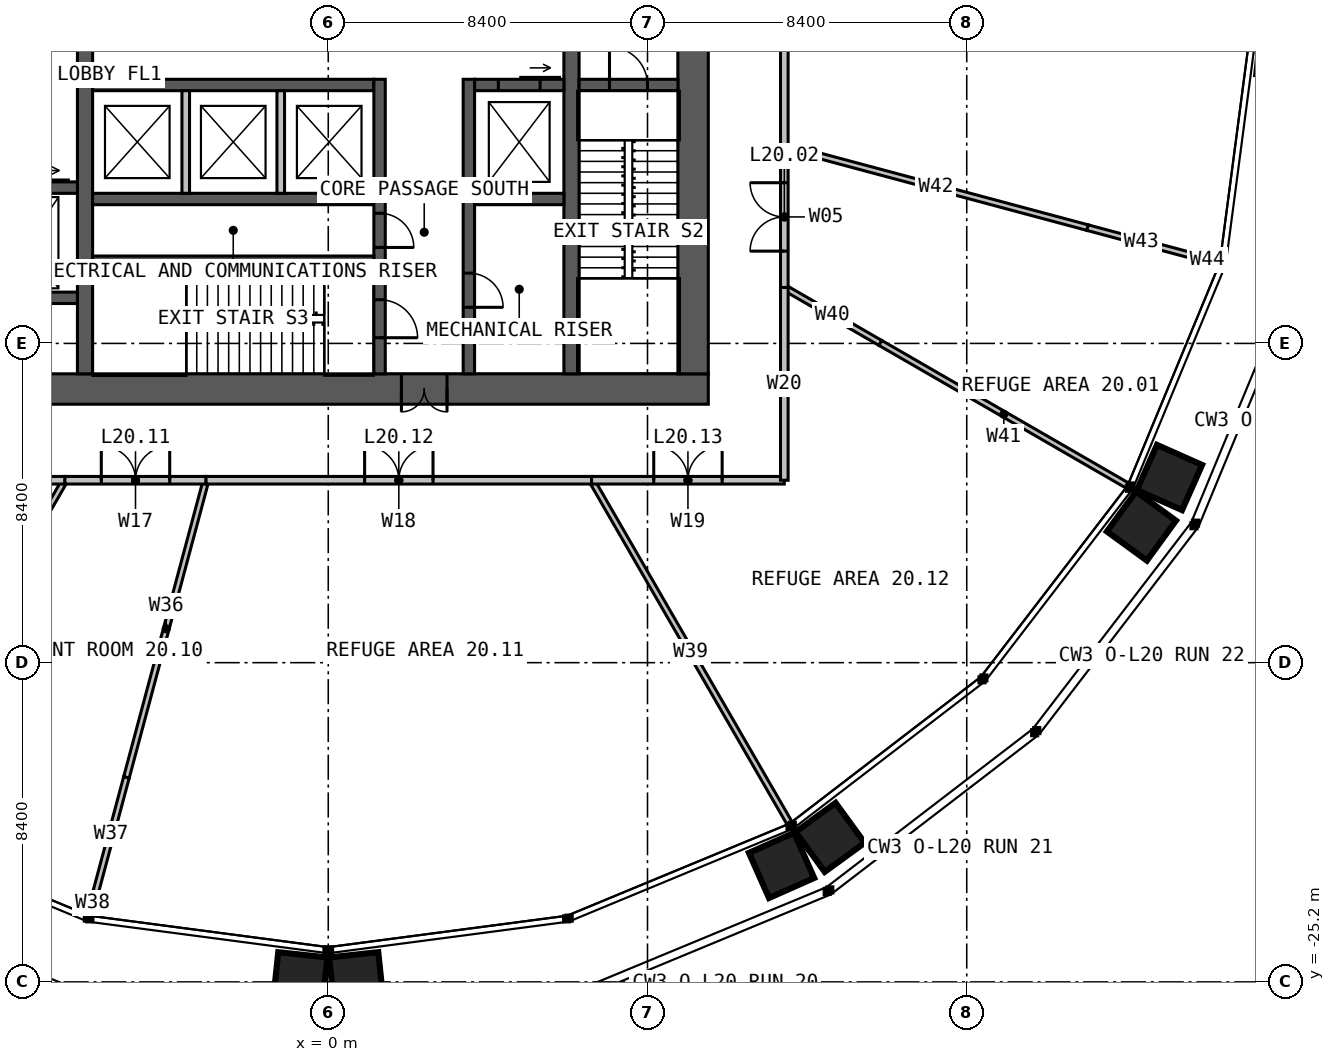
"""IFC4 building model, lengths in metres.
Left out: names, types, materials, properties, quantities, classifications, styles, units other than length and angle.
Written with IfcOpenShell. Run it as: python <this file> out.ifc"""

import sys

from ifc_helpers import new_model, si_unit, direction, frame, frame_2d, origin, place, context, subcontext, project, spatial, rectangle, extrude, element, fill, save


model = new_model("IFC4")
c1 = context("Model", 3, precision=1e-05, world=origin(), true_north=direction((0.0, 1.0)))
c2 = subcontext(c1, "Body", "Model", "MODEL_VIEW")
j1 = project(units=[si_unit("LENGTHUNIT", "METRE"), si_unit("PLANEANGLEUNIT", "RADIAN")], contexts=[c1])
p1 = place(None, origin())
s1 = spatial("IfcSite", under=j1, at=p1, CompositionType="ELEMENT")
p2 = place(p1, origin())
s2 = spatial("IfcBuilding", under=s1, at=p2, CompositionType="ELEMENT")
p3 = place(p2, frame((0.0, 0.0, 85.0)))
s3 = spatial("IfcBuildingStorey", under=s2, at=p3, CompositionType="ELEMENT", Elevation=85.0)
p4 = place(p3, frame((10.0, -9.6, 0.0), z_axis=(0.0, 0.0, 1.0), x_axis=(-1.0, 0.0, 0.0)))
e1 = element("IfcWall", 1, at=p4, inside=s3, PredefinedType="SOLIDWALL", context=c2, shape_type="SweptSolid", body=[
    extrude(rectangle(XDim=20.0, YDim=0.8, at=frame_2d((10.0, 0.0))), origin(), (0.0, 0.0, 1.0), 5.0),
])
p5 = place(p4, frame((6.875, 0.0, 0.0)))
e2 = element("IfcOpeningElement", 2, at=p5, cuts=e1, PredefinedType="OPENING", context=c2, shape_type="SweptSolid", body=[
    extrude(rectangle(XDim=1.2, YDim=2.2, at=frame_2d((0.6, 1.1))), frame((0.0, 0.41, 0.0), z_axis=(0.0, -1.0, 0.0), x_axis=(1.0, 0.0, 0.0)), (0.0, 0.0, 1.0), 0.82),
])
p6 = place(p3, frame((9.6, -9.2, 0.0), z_axis=(0.0, 0.0, 1.0), x_axis=(0.0, 1.0, 0.0)))
e3 = element("IfcWall", 3, at=p6, inside=s3, PredefinedType="SOLIDWALL", context=c2, shape_type="SweptSolid", body=[
    extrude(rectangle(XDim=18.4, YDim=0.8, at=frame_2d((9.2, 0.0))), origin(), (0.0, 0.0, 1.0), 5.0),
])
p7 = place(p3, frame((-6.4, -9.2, 0.0), z_axis=(0.0, 0.0, 1.0), x_axis=(0.0, 1.0, 0.0)))
e4 = element("IfcWall", 4, at=p7, inside=s3, PredefinedType="SOLIDWALL", context=c2, shape_type="SweptSolid", body=[
    extrude(rectangle(XDim=18.4, YDim=0.4, at=frame_2d((9.2, 0.0))), origin(), (0.0, 0.0, 1.0), 5.0),
])
p8 = place(p7, frame((8.7, 0.0, 0.0)))
e5 = element("IfcOpeningElement", 5, at=p8, cuts=e4, PredefinedType="OPENING", context=c2, shape_type="SweptSolid", body=[
    extrude(rectangle(XDim=1.0, YDim=2.2, at=frame_2d((0.5, 1.1))), frame((0.0, 0.21, 0.0), z_axis=(0.0, -1.0, 0.0), x_axis=(1.0, 0.0, 0.0)), (0.0, 0.0, 1.0), 0.42),
])
p9 = place(p3, frame((6.4, 9.2, 0.0), z_axis=(0.0, 0.0, 1.0), x_axis=(0.0, -1.0, 0.0)))
e6 = element("IfcWall", 6, at=p9, inside=s3, PredefinedType="SOLIDWALL", context=c2, shape_type="SweptSolid", body=[
    extrude(rectangle(XDim=18.4, YDim=0.4, at=frame_2d((9.2, 0.0))), origin(), (0.0, 0.0, 1.0), 5.0),
])
p10 = place(p9, frame((8.7, 0.0, 0.0)))
e7 = element("IfcOpeningElement", 7, at=p10, cuts=e6, PredefinedType="OPENING", context=c2, shape_type="SweptSolid", body=[
    extrude(rectangle(XDim=1.0, YDim=2.2, at=frame_2d((0.5, 1.1))), frame((0.0, 0.21, 0.0), z_axis=(0.0, -1.0, 0.0), x_axis=(1.0, 0.0, 0.0)), (0.0, 0.0, 1.0), 0.42),
])
p11 = place(p3, frame((-6.2, -1.6, 0.0), z_axis=(0.0, 0.0, 1.0), x_axis=(1.0, 0.0, 0.0)))
e8 = element("IfcWall", 8, at=p11, inside=s3, PredefinedType="SOLIDWALL", context=c2, shape_type="SweptSolid", body=[
    extrude(rectangle(XDim=7.4, YDim=0.3, at=frame_2d((3.7, 0.0))), origin(), (0.0, 0.0, 1.0), 5.0),
])
p12 = place(p3, frame((3.85, -1.6, 0.0), z_axis=(0.0, 0.0, 1.0), x_axis=(1.0, 0.0, 0.0)))
e9 = element("IfcWall", 9, at=p12, inside=s3, PredefinedType="SOLIDWALL", context=c2, shape_type="SweptSolid", body=[
    extrude(rectangle(XDim=2.35, YDim=0.3, at=frame_2d((1.175, 0.0))), origin(), (0.0, 0.0, 1.0), 5.0),
])
p13 = place(p12, frame((0.625, 0.0, 0.0)))
e10 = element("IfcOpeningElement", 10, at=p13, cuts=e9, PredefinedType="OPENING", context=c2, shape_type="SweptSolid", body=[
    extrude(rectangle(XDim=1.1, YDim=2.2, at=frame_2d((0.55, 1.1))), frame((0.0, 0.16, 0.0), z_axis=(0.0, -1.0, 0.0), x_axis=(1.0, 0.0, 0.0)), (0.0, 0.0, 1.0), 0.32),
])
p14 = place(p3, frame((-6.2, -4.6, 0.0), z_axis=(0.0, 0.0, 1.0), x_axis=(1.0, 0.0, 0.0)))
e11 = element("IfcWall", 11, at=p14, inside=s3, PredefinedType="SOLIDWALL", context=c2, shape_type="SweptSolid", body=[
    extrude(rectangle(XDim=7.4, YDim=0.3, at=frame_2d((3.7, 0.0))), origin(), (0.0, 0.0, 1.0), 5.0),
])
p15 = place(p3, frame((3.85, -4.6, 0.0), z_axis=(0.0, 0.0, 1.0), x_axis=(1.0, 0.0, 0.0)))
e12 = element("IfcWall", 12, at=p15, inside=s3, PredefinedType="SOLIDWALL", context=c2, shape_type="SweptSolid", body=[
    extrude(rectangle(XDim=2.35, YDim=0.3, at=frame_2d((1.175, 0.0))), origin(), (0.0, 0.0, 1.0), 5.0),
])
p16 = place(p3, frame((1.35, -1.45, 0.0), z_axis=(0.0, 0.0, 1.0), x_axis=(0.0, -1.0, 0.0)))
e13 = element("IfcWall", 13, at=p16, inside=s3, PredefinedType="SOLIDWALL", context=c2, shape_type="SweptSolid", body=[
    extrude(rectangle(XDim=7.75, YDim=0.3, at=frame_2d((3.875, 0.0))), origin(), (0.0, 0.0, 1.0), 5.0),
])
p17 = place(p16, frame((5.8, 0.0, 0.0)))
e14 = element("IfcOpeningElement", 14, at=p17, cuts=e13, PredefinedType="OPENING", context=c2, shape_type="SweptSolid", body=[
    extrude(rectangle(XDim=1.0, YDim=2.2, at=frame_2d((0.5, 1.1))), frame((0.0, 0.16, 0.0), z_axis=(0.0, -1.0, 0.0), x_axis=(1.0, 0.0, 0.0)), (0.0, 0.0, 1.0), 0.32),
])
p18 = place(p16, frame((3.525, 0.0, 0.0)))
e15 = element("IfcOpeningElement", 15, at=p18, cuts=e13, PredefinedType="OPENING", context=c2, shape_type="SweptSolid", body=[
    extrude(rectangle(XDim=0.9, YDim=2.2, at=frame_2d((0.45, 1.1))), frame((0.0, 0.16, 0.0), z_axis=(0.0, -1.0, 0.0), x_axis=(1.0, 0.0, 0.0)), (0.0, 0.0, 1.0), 0.32),
])
p19 = place(p3, frame((3.7, -1.45, 0.0), z_axis=(0.0, 0.0, 1.0), x_axis=(0.0, -1.0, 0.0)))
e16 = element("IfcWall", 16, at=p19, inside=s3, PredefinedType="SOLIDWALL", context=c2, shape_type="SweptSolid", body=[
    extrude(rectangle(XDim=7.75, YDim=0.3, at=frame_2d((3.875, 0.0))), origin(), (0.0, 0.0, 1.0), 5.0),
])
p20 = place(p19, frame((5.1, 0.0, 0.0)))
e17 = element("IfcOpeningElement", 17, at=p20, cuts=e16, PredefinedType="OPENING", context=c2, shape_type="SweptSolid", body=[
    extrude(rectangle(XDim=0.9, YDim=2.2, at=frame_2d((0.45, 1.1))), frame((0.0, 0.16, 0.0), z_axis=(0.0, -1.0, 0.0), x_axis=(1.0, 0.0, 0.0)), (0.0, 0.0, 1.0), 0.32),
])
p21 = place(p3, frame((-6.2, -6.2, 0.0), z_axis=(0.0, 0.0, 1.0), x_axis=(1.0, 0.0, 0.0)))
e18 = element("IfcWall", 18, at=p21, inside=s3, PredefinedType="SOLIDWALL", context=c2, shape_type="SweptSolid", body=[
    extrude(rectangle(XDim=7.4, YDim=0.2, at=frame_2d((3.7, 0.0))), origin(), (0.0, 0.0, 1.0), 5.0),
])
p22 = place(p3, frame((6.6, -1.6, 0.0), z_axis=(0.0, 0.0, 1.0), x_axis=(1.0, 0.0, 0.0)))
e19 = element("IfcWall", 19, at=p22, inside=s3, PredefinedType="SOLIDWALL", context=c2, shape_type="SweptSolid", body=[
    extrude(rectangle(XDim=2.6, YDim=0.3, at=frame_2d((1.3, 0.0))), origin(), (0.0, 0.0, 1.0), 5.0),
])
p23 = place(p22, frame((0.8, 0.0, 0.0)))
e20 = element("IfcOpeningElement", 20, at=p23, cuts=e19, PredefinedType="OPENING", context=c2, shape_type="SweptSolid", body=[
    extrude(rectangle(XDim=1.0, YDim=2.2, at=frame_2d((0.5, 1.1))), frame((0.0, 0.16, 0.0), z_axis=(0.0, -1.0, 0.0), x_axis=(1.0, 0.0, 0.0)), (0.0, 0.0, 1.0), 0.32),
])
p24 = place(p3, frame((-9.2, -4.3, 0.0), z_axis=(0.0, 0.0, 1.0), x_axis=(1.0, 0.0, 0.0)))
e21 = element("IfcWall", 21, at=p24, inside=s3, PredefinedType="SOLIDWALL", context=c2, shape_type="SweptSolid", body=[
    extrude(rectangle(XDim=2.6, YDim=0.3, at=frame_2d((1.3, 0.0))), origin(), (0.0, 0.0, 1.0), 5.0),
])
p25 = place(p24, frame((0.75, 0.0, 0.0)))
e22 = element("IfcOpeningElement", 22, at=p25, cuts=e21, PredefinedType="OPENING", context=c2, shape_type="SweptSolid", body=[
    extrude(rectangle(XDim=1.1, YDim=2.2, at=frame_2d((0.55, 1.1))), frame((0.0, 0.16, 0.0), z_axis=(0.0, -1.0, 0.0), x_axis=(1.0, 0.0, 0.0)), (0.0, 0.0, 1.0), 0.32),
])
p26 = place(p3, frame((-9.2, -7.2, 0.0), z_axis=(0.0, 0.0, 1.0), x_axis=(1.0, 0.0, 0.0)))
e23 = element("IfcWall", 23, at=p26, inside=s3, PredefinedType="SOLIDWALL", context=c2, shape_type="SweptSolid", body=[
    extrude(rectangle(XDim=2.6, YDim=0.3, at=frame_2d((1.3, 0.0))), origin(), (0.0, 0.0, 1.0), 5.0),
])
for number, where, z_axis, x_axis in (
    (24, (-3.75, -1.75, 0.0), (0.0, 0.0, 1.0), (0.0, -1.0, 0.0)),
    (25, (-1.25, -1.75, 0.0), (0.0, 0.0, 1.0), (0.0, -1.0, 0.0)),
):
    element("IfcWall", number, at=place(p3, frame(where, z_axis=z_axis, x_axis=x_axis)), inside=s3, PredefinedType="SOLIDWALL", context=c2, shape_type="SweptSolid", body=[
        extrude(rectangle(XDim=2.7, YDim=0.2, at=frame_2d((1.35, 0.0))), origin(), (0.0, 0.0, 1.0), 4.75),
    ])
p27 = place(p3, frame((12.0, -6.928, 0.0), z_axis=(0.0, 0.0, 1.0), x_axis=(0.866026830048, -0.499997529631, 0.0)))
e26 = element("IfcWall", 26, at=p27, inside=s3, PredefinedType="PARTITIONING", context=c2, shape_type="SweptSolid", body=[
    extrude(rectangle(XDim=2.919, YDim=0.15, at=frame_2d((1.46, 0.0))), origin(), (0.0, 0.0, 1.0), 3.79),
])
p28 = place(p3, frame((14.528, -8.388, 0.0), z_axis=(0.0, 0.0, 1.0), x_axis=(0.8660207781, -0.500008011835, 0.0)))
e27 = element("IfcWall", 27, at=p28, inside=s3, PredefinedType="PARTITIONING", context=c2, shape_type="SweptSolid", body=[
    extrude(rectangle(XDim=7.5, YDim=0.15, at=frame_2d((3.75, 0.0))), origin(), (0.0, 0.0, 1.0), 4.8),
])
p29 = place(p3, frame((12.0, -3.215, 0.0), z_axis=(0.0, 0.0, 1.0), x_axis=(0.965926149295, -0.258817839624, 0.0)))
e28 = element("IfcWall", 28, at=p29, inside=s3, PredefinedType="PARTITIONING", context=c2, shape_type="SweptSolid", body=[
    extrude(rectangle(XDim=8.26, YDim=0.15, at=frame_2d((4.13, 0.0))), origin(), (0.0, 0.0, 1.0), 4.8),
])
p30 = place(p3, frame((19.978, -5.353, 0.0), z_axis=(0.0, 0.0, 1.0), x_axis=(0.965910471853, -0.258876341839, 0.0)))
e29 = element("IfcWall", 29, at=p30, inside=s3, PredefinedType="PARTITIONING", context=c2, shape_type="SweptSolid", body=[
    extrude(rectangle(XDim=2.929, YDim=0.15, at=frame_2d((1.465, 0.0))), origin(), (0.0, 0.0, 1.0), 3.79),
])
p31 = place(p3, frame((22.807, -6.111, 0.0), z_axis=(0.0, 0.0, 1.0), x_axis=(0.965934907189, -0.258785152345, 0.0)))
e30 = element("IfcWall", 30, at=p31, inside=s3, PredefinedType="PARTITIONING", context=c2, shape_type="SweptSolid", body=[
    extrude(rectangle(XDim=0.663, YDim=0.15, at=frame_2d((0.332, 0.0))), origin(), (0.0, 0.0, 1.0), 4.8),
])
p32 = place(p3, frame((-6.928, -12.0, 0.0), z_axis=(0.0, 0.0, 1.0), x_axis=(-0.500005074639, -0.86602247392, 0.0)))
e31 = element("IfcWall", 31, at=p32, inside=s3, PredefinedType="PARTITIONING", context=c2, shape_type="SweptSolid", body=[
    extrude(rectangle(XDim=10.419, YDim=0.15, at=frame_2d((5.209, 0.0))), origin(), (0.0, 0.0, 1.0), 4.8),
])
p33 = place(p3, frame((-3.215, -12.0, 0.0), z_axis=(0.0, 0.0, 1.0), x_axis=(-0.258830053586, -0.965922876508, 0.0)))
e32 = element("IfcWall", 32, at=p33, inside=s3, PredefinedType="PARTITIONING", context=c2, shape_type="SweptSolid", body=[
    extrude(rectangle(XDim=8.095, YDim=0.15, at=frame_2d((4.047, 0.0))), origin(), (0.0, 0.0, 1.0), 4.8),
])
p34 = place(p3, frame((-5.311, -19.819, 0.0), z_axis=(0.0, 0.0, 1.0), x_axis=(-0.258835525839, -0.965921410138, 0.0)))
e33 = element("IfcWall", 33, at=p34, inside=s3, PredefinedType="PARTITIONING", context=c2, shape_type="SweptSolid", body=[
    extrude(rectangle(XDim=3.109, YDim=0.15, at=frame_2d((1.554, 0.0))), origin(), (0.0, 0.0, 1.0), 3.79),
])
p35 = place(p3, frame((-6.115, -22.822, 0.0), z_axis=(0.0, 0.0, 1.0), x_axis=(-0.258811407408, -0.965927872771, 0.0)))
e34 = element("IfcWall", 34, at=p35, inside=s3, PredefinedType="PARTITIONING", context=c2, shape_type="SweptSolid", body=[
    extrude(rectangle(XDim=0.648, YDim=0.15, at=frame_2d((0.324, 0.0))), origin(), (0.0, 0.0, 1.0), 4.8),
])
p36 = place(p3, frame((6.928, -12.0, 0.0), z_axis=(0.0, 0.0, 1.0), x_axis=(0.500005074639, -0.86602247392, 0.0)))
e35 = element("IfcWall", 35, at=p36, inside=s3, PredefinedType="PARTITIONING", context=c2, shape_type="SweptSolid", body=[
    extrude(rectangle(XDim=10.419, YDim=0.15, at=frame_2d((5.209, 0.0))), origin(), (0.0, 0.0, 1.0), 4.8),
])
p37 = place(p3, frame((12.0, -6.928, 0.0), z_axis=(0.0, 0.0, 1.0), x_axis=(0.0, 1.0, 0.0)))
e36 = element("IfcWall", 36, at=p37, inside=s3, PredefinedType="PARTITIONING", context=c2, shape_type="SweptSolid", body=[
    extrude(rectangle(XDim=3.713, YDim=0.2, at=frame_2d((1.856, 0.0))), origin(), (0.0, 0.0, 1.0), 4.8),
])
p38 = place(p37, frame((0.956, 0.0, 0.0)))
e37 = element("IfcOpeningElement", 37, at=p38, cuts=e36, PredefinedType="OPENING", context=c2, shape_type="SweptSolid", body=[
    extrude(rectangle(XDim=1.8, YDim=2.2, at=frame_2d((0.9, 1.1))), frame((0.0, 0.11, 0.0), z_axis=(0.0, -1.0, 0.0), x_axis=(1.0, 0.0, 0.0)), (0.0, 0.0, 1.0), 0.22),
])
p39 = place(p3, frame((12.0, -3.215, 0.0), z_axis=(0.0, 0.0, 1.0), x_axis=(0.0, 1.0, 0.0)))
e38 = element("IfcWall", 38, at=p39, inside=s3, PredefinedType="PARTITIONING", context=c2, shape_type="SweptSolid", body=[
    extrude(rectangle(XDim=10.144, YDim=0.2, at=frame_2d((5.072, 0.0))), origin(), (0.0, 0.0, 1.0), 4.8),
])
p40 = place(p39, frame((4.172, 0.0, 0.0)))
e39 = element("IfcOpeningElement", 39, at=p40, cuts=e38, PredefinedType="OPENING", context=c2, shape_type="SweptSolid", body=[
    extrude(rectangle(XDim=1.8, YDim=2.2, at=frame_2d((0.9, 1.1))), frame((0.0, 0.11, 0.0), z_axis=(0.0, -1.0, 0.0), x_axis=(1.0, 0.0, 0.0)), (0.0, 0.0, 1.0), 0.22),
])
p41 = place(p3, frame((-12.0, -12.0, 0.0), z_axis=(0.0, 0.0, 1.0), x_axis=(1.0, 0.0, 0.0)))
e40 = element("IfcWall", 40, at=p41, inside=s3, PredefinedType="PARTITIONING", context=c2, shape_type="SweptSolid", body=[
    extrude(rectangle(XDim=5.072, YDim=0.2, at=frame_2d((2.536, 0.0))), origin(), (0.0, 0.0, 1.0), 4.8),
])
p42 = place(p3, frame((-6.928, -12.0, 0.0), z_axis=(0.0, 0.0, 1.0), x_axis=(1.0, 0.0, 0.0)))
e41 = element("IfcWall", 41, at=p42, inside=s3, PredefinedType="PARTITIONING", context=c2, shape_type="SweptSolid", body=[
    extrude(rectangle(XDim=3.713, YDim=0.2, at=frame_2d((1.856, 0.0))), origin(), (0.0, 0.0, 1.0), 4.8),
])
p43 = place(p42, frame((0.956, 0.0, 0.0)))
e42 = element("IfcOpeningElement", 42, at=p43, cuts=e41, PredefinedType="OPENING", context=c2, shape_type="SweptSolid", body=[
    extrude(rectangle(XDim=1.8, YDim=2.2, at=frame_2d((0.9, 1.1))), frame((0.0, 0.11, 0.0), z_axis=(0.0, -1.0, 0.0), x_axis=(1.0, 0.0, 0.0)), (0.0, 0.0, 1.0), 0.22),
])
p44 = place(p3, frame((-3.215, -12.0, 0.0), z_axis=(0.0, 0.0, 1.0), x_axis=(1.0, 0.0, 0.0)))
e43 = element("IfcWall", 43, at=p44, inside=s3, PredefinedType="PARTITIONING", context=c2, shape_type="SweptSolid", body=[
    extrude(rectangle(XDim=10.144, YDim=0.2, at=frame_2d((5.072, 0.0))), origin(), (0.0, 0.0, 1.0), 4.8),
])
p45 = place(p44, frame((4.172, 0.0, 0.0)))
e44 = element("IfcOpeningElement", 44, at=p45, cuts=e43, PredefinedType="OPENING", context=c2, shape_type="SweptSolid", body=[
    extrude(rectangle(XDim=1.8, YDim=2.2, at=frame_2d((0.9, 1.1))), frame((0.0, 0.11, 0.0), z_axis=(0.0, -1.0, 0.0), x_axis=(1.0, 0.0, 0.0)), (0.0, 0.0, 1.0), 0.22),
])
p46 = place(p3, frame((6.928, -12.0, 0.0), z_axis=(0.0, 0.0, 1.0), x_axis=(1.0, 0.0, 0.0)))
e45 = element("IfcWall", 45, at=p46, inside=s3, PredefinedType="PARTITIONING", context=c2, shape_type="SweptSolid", body=[
    extrude(rectangle(XDim=5.072, YDim=0.2, at=frame_2d((2.536, 0.0))), origin(), (0.0, 0.0, 1.0), 4.8),
])
p47 = place(p46, frame((1.636, 0.0, 0.0)))
e46 = element("IfcOpeningElement", 46, at=p47, cuts=e45, PredefinedType="OPENING", context=c2, shape_type="SweptSolid", body=[
    extrude(rectangle(XDim=1.8, YDim=2.2, at=frame_2d((0.9, 1.1))), frame((0.0, 0.11, 0.0), z_axis=(0.0, -1.0, 0.0), x_axis=(1.0, 0.0, 0.0)), (0.0, 0.0, 1.0), 0.22),
])
p48 = place(p3, frame((12.0, -12.0, 0.0), z_axis=(0.0, 0.0, 1.0), x_axis=(0.0, 1.0, 0.0)))
e47 = element("IfcWall", 47, at=p48, inside=s3, PredefinedType="PARTITIONING", context=c2, shape_type="SweptSolid", body=[
    extrude(rectangle(XDim=5.072, YDim=0.2, at=frame_2d((2.536, 0.0))), origin(), (0.0, 0.0, 1.0), 4.8),
])
p49 = place(p5, origin())
e48 = element("IfcDoor", 48, at=p49, inside=s3, OperationType="DOUBLE_DOOR_SINGLE_SWING", PredefinedType="DOOR", context=c2, shape_type="SweptSolid", body=[
    extrude(rectangle(XDim=1.2, YDim=2.2, at=frame_2d((0.6, 1.1))), frame((0.0, 0.025, 0.0), z_axis=(0.0, -1.0, 0.0), x_axis=(1.0, 0.0, 0.0)), (0.0, 0.0, 1.0), 0.05),
])
fill(e2, e48)
p50 = place(p23, origin())
e49 = element("IfcDoor", 49, at=p50, inside=s3, OperationType="SINGLE_SWING_LEFT", PredefinedType="DOOR", context=c2, shape_type="SweptSolid", body=[
    extrude(rectangle(XDim=1.0, YDim=2.2, at=frame_2d((0.5, 1.1))), frame((0.0, 0.025, 0.0), z_axis=(0.0, -1.0, 0.0), x_axis=(1.0, 0.0, 0.0)), (0.0, 0.0, 1.0), 0.05),
])
fill(e20, e49)
p51 = place(p17, origin())
e50 = element("IfcDoor", 50, at=p51, inside=s3, OperationType="SINGLE_SWING_RIGHT", PredefinedType="DOOR", context=c2, shape_type="SweptSolid", body=[
    extrude(rectangle(XDim=1.0, YDim=2.2, at=frame_2d((0.5, 1.1))), frame((0.0, 0.025, 0.0), z_axis=(0.0, -1.0, 0.0), x_axis=(1.0, 0.0, 0.0)), (0.0, 0.0, 1.0), 0.05),
])
fill(e14, e50)
p52 = place(p18, origin())
e51 = element("IfcDoor", 51, at=p52, inside=s3, OperationType="SINGLE_SWING_RIGHT", PredefinedType="DOOR", context=c2, shape_type="SweptSolid", body=[
    extrude(rectangle(XDim=0.9, YDim=2.2, at=frame_2d((0.45, 1.1))), frame((0.0, 0.025, 0.0), z_axis=(0.0, -1.0, 0.0), x_axis=(1.0, 0.0, 0.0)), (0.0, 0.0, 1.0), 0.05),
])
fill(e15, e51)
p53 = place(p20, origin())
e52 = element("IfcDoor", 52, at=p53, inside=s3, OperationType="SINGLE_SWING_RIGHT", PredefinedType="DOOR", context=c2, shape_type="SweptSolid", body=[
    extrude(rectangle(XDim=0.9, YDim=2.2, at=frame_2d((0.45, 1.1))), frame((0.0, 0.025, 0.0), z_axis=(0.0, -1.0, 0.0), x_axis=(1.0, 0.0, 0.0)), (0.0, 0.0, 1.0), 0.05),
])
fill(e17, e52)
p54 = place(p13, origin())
e53 = element("IfcDoor", 53, at=p54, inside=s3, OperationType="SLIDING_TO_LEFT", PredefinedType="DOOR", context=c2, shape_type="SweptSolid", body=[
    extrude(rectangle(XDim=1.1, YDim=2.2, at=frame_2d((0.55, 1.1))), frame((0.0, 0.025, 0.0), z_axis=(0.0, -1.0, 0.0), x_axis=(1.0, 0.0, 0.0)), (0.0, 0.0, 1.0), 0.05),
])
fill(e10, e53)
p55 = place(p38, origin())
e54 = element("IfcDoor", 54, at=p55, inside=s3, OperationType="DOUBLE_DOOR_SINGLE_SWING", PredefinedType="DOOR", context=c2, shape_type="SweptSolid", body=[
    extrude(rectangle(XDim=1.8, YDim=2.2, at=frame_2d((0.9, 1.1))), frame((0.0, 0.025, 0.0), z_axis=(0.0, -1.0, 0.0), x_axis=(1.0, 0.0, 0.0)), (0.0, 0.0, 1.0), 0.05),
])
fill(e37, e54)
p56 = place(p43, origin())
e55 = element("IfcDoor", 55, at=p56, inside=s3, OperationType="DOUBLE_DOOR_SINGLE_SWING", PredefinedType="DOOR", context=c2, shape_type="SweptSolid", body=[
    extrude(rectangle(XDim=1.8, YDim=2.2, at=frame_2d((0.9, 1.1))), frame((0.0, 0.025, 0.0), z_axis=(0.0, -1.0, 0.0), x_axis=(1.0, 0.0, 0.0)), (0.0, 0.0, 1.0), 0.05),
])
fill(e42, e55)
p57 = place(p45, origin())
e56 = element("IfcDoor", 56, at=p57, inside=s3, OperationType="DOUBLE_DOOR_SINGLE_SWING", PredefinedType="DOOR", context=c2, shape_type="SweptSolid", body=[
    extrude(rectangle(XDim=1.8, YDim=2.2, at=frame_2d((0.9, 1.1))), frame((0.0, 0.025, 0.0), z_axis=(0.0, -1.0, 0.0), x_axis=(1.0, 0.0, 0.0)), (0.0, 0.0, 1.0), 0.05),
])
fill(e44, e56)
p58 = place(p47, origin())
e57 = element("IfcDoor", 57, at=p58, inside=s3, OperationType="DOUBLE_DOOR_SINGLE_SWING", PredefinedType="DOOR", context=c2, shape_type="SweptSolid", body=[
    extrude(rectangle(XDim=1.8, YDim=2.2, at=frame_2d((0.9, 1.1))), frame((0.0, 0.025, 0.0), z_axis=(0.0, -1.0, 0.0), x_axis=(1.0, 0.0, 0.0)), (0.0, 0.0, 1.0), 0.05),
])
fill(e46, e57)
save(model, sys.argv[1])
